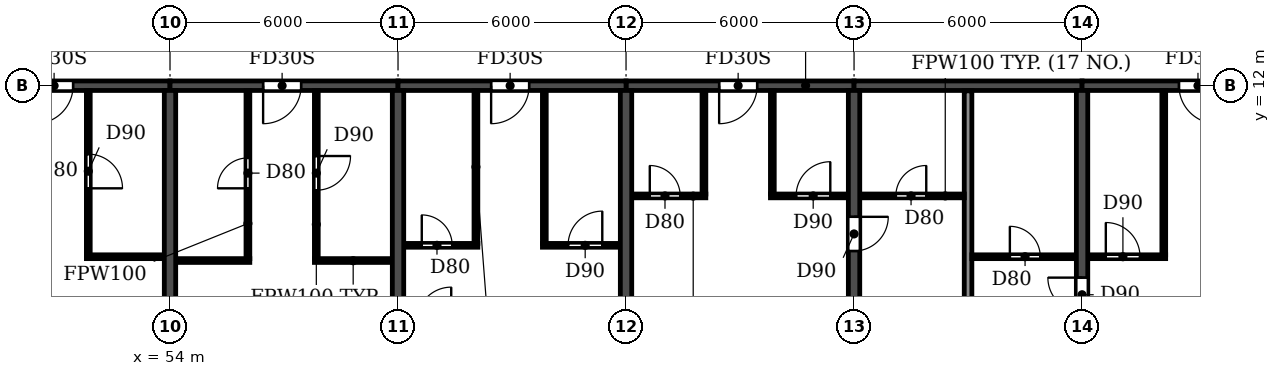
"""IFC4 building model, lengths in metres.
Left out: names, types, materials, properties, quantities, classifications, styles, units other than length and angle.
Written with IfcOpenShell. Run it as: python <this file> out.ifc"""

import sys

from ifc_helpers import new_model, si_unit, direction, frame, frame_2d, origin, place, context, subcontext, project, spatial, rectangle, extrude, element, fill, save


model = new_model("IFC4")
c1 = context("Model", 3, precision=1e-05, world=origin(), true_north=direction((0.0, 1.0)))
c2 = subcontext(c1, "Body", "Model", "MODEL_VIEW")
j1 = project(units=[si_unit("LENGTHUNIT", "METRE"), si_unit("PLANEANGLEUNIT", "RADIAN")], contexts=[c1])
p1 = place(None, origin())
s1 = spatial("IfcSite", under=j1, at=p1, CompositionType="ELEMENT")
p2 = place(p1, origin())
s2 = spatial("IfcBuilding", under=s1, at=p2, CompositionType="ELEMENT")
p3 = place(p2, frame((0.0, 0.0, 142.2)))
s3 = spatial("IfcBuildingStorey", under=s2, at=p3, CompositionType="ELEMENT", Elevation=142.2)
for number, where, z_axis, x_axis in (
    (1, (54.0, 0.2, 0.0), (0.0, 0.0, 1.0), (0.0, 1.0, 0.0)),
    (2, (60.0, 0.2, 0.0), (0.0, 0.0, 1.0), (0.0, 1.0, 0.0)),
    (3, (66.0, 0.2, 0.0), (0.0, 0.0, 1.0), (0.0, 1.0, 0.0)),
):
    element("IfcWall", number, at=place(p3, frame(where, z_axis=z_axis, x_axis=x_axis)), inside=s3, PredefinedType="SHEAR", context=c2, shape_type="SweptSolid", body=[
        extrude(rectangle(XDim=11.675, YDim=0.3, at=frame_2d((5.837, 0.0))), origin(), (0.0, 0.0, 1.0), 3.07),
    ])
p4 = place(p3, frame((72.0, 0.2, 0.0), z_axis=(0.0, 0.0, 1.0), x_axis=(0.0, 1.0, 0.0)))
e4 = element("IfcWall", 4, at=p4, inside=s3, PredefinedType="SHEAR", context=c2, shape_type="SweptSolid", body=[
    extrude(rectangle(XDim=11.675, YDim=0.3, at=frame_2d((5.837, 0.0))), origin(), (0.0, 0.0, 1.0), 3.07),
])
p5 = place(p4, frame((7.45, 0.0, 0.0)))
e5 = element("IfcOpeningElement", 5, at=p5, cuts=e4, PredefinedType="OPENING", context=c2, shape_type="SweptSolid", body=[
    extrude(rectangle(XDim=0.9, YDim=2.1, at=frame_2d((0.45, 1.05))), frame((0.0, 0.16, 0.0), z_axis=(0.0, -1.0, 0.0), x_axis=(1.0, 0.0, 0.0)), (0.0, 0.0, 1.0), 0.32),
])
p6 = place(p3, frame((78.0, 0.2, 0.0), z_axis=(0.0, 0.0, 1.0), x_axis=(0.0, 1.0, 0.0)))
e6 = element("IfcWall", 6, at=p6, inside=s3, PredefinedType="SHEAR", context=c2, shape_type="SweptSolid", body=[
    extrude(rectangle(XDim=11.675, YDim=0.3, at=frame_2d((5.837, 0.0))), origin(), (0.0, 0.0, 1.0), 3.07),
])
p7 = place(p6, frame((5.85, 0.0, 0.0)))
e7 = element("IfcOpeningElement", 7, at=p7, cuts=e6, PredefinedType="OPENING", context=c2, shape_type="SweptSolid", body=[
    extrude(rectangle(XDim=0.9, YDim=2.1, at=frame_2d((0.45, 1.05))), frame((0.0, 0.16, 0.0), z_axis=(0.0, -1.0, 0.0), x_axis=(1.0, 0.0, 0.0)), (0.0, 0.0, 1.0), 0.32),
])
p8 = place(p3, frame((48.0, 12.0, 0.0), z_axis=(0.0, 0.0, 1.0), x_axis=(1.0, 0.0, 0.0)))
e8 = element("IfcWall", 8, at=p8, inside=s3, PredefinedType="SHEAR", context=c2, shape_type="SweptSolid", body=[
    extrude(rectangle(XDim=6.0, YDim=0.25, at=frame_2d((3.0, 0.0))), origin(), (0.0, 0.0, 1.0), 2.47),
])
p9 = place(p8, frame((2.45, 0.0, 0.0)))
e9 = element("IfcOpeningElement", 9, at=p9, cuts=e8, PredefinedType="OPENING", context=c2, shape_type="SweptSolid", body=[
    extrude(rectangle(XDim=1.0, YDim=2.1, at=frame_2d((0.5, 1.05))), frame((0.0, 0.135, 0.0), z_axis=(0.0, -1.0, 0.0), x_axis=(1.0, 0.0, 0.0)), (0.0, 0.0, 1.0), 0.27),
])
p10 = place(p3, frame((54.0, 12.0, 0.0), z_axis=(0.0, 0.0, 1.0), x_axis=(1.0, 0.0, 0.0)))
e10 = element("IfcWall", 10, at=p10, inside=s3, PredefinedType="SHEAR", context=c2, shape_type="SweptSolid", body=[
    extrude(rectangle(XDim=6.0, YDim=0.25, at=frame_2d((3.0, 0.0))), origin(), (0.0, 0.0, 1.0), 2.47),
])
p11 = place(p10, frame((2.45, 0.0, 0.0)))
e11 = element("IfcOpeningElement", 11, at=p11, cuts=e10, PredefinedType="OPENING", context=c2, shape_type="SweptSolid", body=[
    extrude(rectangle(XDim=1.0, YDim=2.1, at=frame_2d((0.5, 1.05))), frame((0.0, 0.135, 0.0), z_axis=(0.0, -1.0, 0.0), x_axis=(1.0, 0.0, 0.0)), (0.0, 0.0, 1.0), 0.27),
])
p12 = place(p3, frame((60.0, 12.0, 0.0), z_axis=(0.0, 0.0, 1.0), x_axis=(1.0, 0.0, 0.0)))
e12 = element("IfcWall", 12, at=p12, inside=s3, PredefinedType="SHEAR", context=c2, shape_type="SweptSolid", body=[
    extrude(rectangle(XDim=6.0, YDim=0.25, at=frame_2d((3.0, 0.0))), origin(), (0.0, 0.0, 1.0), 2.47),
])
p13 = place(p12, frame((2.45, 0.0, 0.0)))
e13 = element("IfcOpeningElement", 13, at=p13, cuts=e12, PredefinedType="OPENING", context=c2, shape_type="SweptSolid", body=[
    extrude(rectangle(XDim=1.0, YDim=2.1, at=frame_2d((0.5, 1.05))), frame((0.0, 0.135, 0.0), z_axis=(0.0, -1.0, 0.0), x_axis=(1.0, 0.0, 0.0)), (0.0, 0.0, 1.0), 0.27),
])
p14 = place(p3, frame((66.0, 12.0, 0.0), z_axis=(0.0, 0.0, 1.0), x_axis=(1.0, 0.0, 0.0)))
e14 = element("IfcWall", 14, at=p14, inside=s3, PredefinedType="SHEAR", context=c2, shape_type="SweptSolid", body=[
    extrude(rectangle(XDim=6.0, YDim=0.25, at=frame_2d((3.0, 0.0))), origin(), (0.0, 0.0, 1.0), 2.47),
])
p15 = place(p14, frame((2.45, 0.0, 0.0)))
e15 = element("IfcOpeningElement", 15, at=p15, cuts=e14, PredefinedType="OPENING", context=c2, shape_type="SweptSolid", body=[
    extrude(rectangle(XDim=1.0, YDim=2.1, at=frame_2d((0.5, 1.05))), frame((0.0, 0.135, 0.0), z_axis=(0.0, -1.0, 0.0), x_axis=(1.0, 0.0, 0.0)), (0.0, 0.0, 1.0), 0.27),
])
p16 = place(p3, frame((72.0, 12.0, 0.0), z_axis=(0.0, 0.0, 1.0), x_axis=(1.0, 0.0, 0.0)))
e16 = element("IfcWall", 16, at=p16, inside=s3, PredefinedType="SHEAR", context=c2, shape_type="SweptSolid", body=[
    extrude(rectangle(XDim=6.0, YDim=0.25, at=frame_2d((3.0, 0.0))), origin(), (0.0, 0.0, 1.0), 2.47),
])
p17 = place(p3, frame((78.0, 12.0, 0.0), z_axis=(0.0, 0.0, 1.0), x_axis=(1.0, 0.0, 0.0)))
e17 = element("IfcWall", 17, at=p17, inside=s3, PredefinedType="SHEAR", context=c2, shape_type="SweptSolid", body=[
    extrude(rectangle(XDim=6.0, YDim=0.25, at=frame_2d((3.0, 0.0))), origin(), (0.0, 0.0, 1.0), 2.47),
])
p18 = place(p17, frame((2.55, 0.0, 0.0)))
e18 = element("IfcOpeningElement", 18, at=p18, cuts=e17, PredefinedType="OPENING", context=c2, shape_type="SweptSolid", body=[
    extrude(rectangle(XDim=1.0, YDim=2.1, at=frame_2d((0.5, 1.05))), frame((0.0, 0.135, 0.0), z_axis=(0.0, -1.0, 0.0), x_axis=(1.0, 0.0, 0.0)), (0.0, 0.0, 1.0), 0.27),
])
p19 = place(p3, frame((75.0, 0.06, 0.0), z_axis=(0.0, 0.0, 1.0), x_axis=(0.0, 1.0, 0.0)))
e19 = element("IfcWall", 19, at=p19, inside=s3, PredefinedType="PARTITIONING", context=c2, shape_type="SweptSolid", body=[
    extrude(rectangle(XDim=11.805, YDim=0.2, at=frame_2d((5.902, 0.0))), origin(), (0.0, 0.0, 1.0), 3.07),
])
p20 = place(p3, frame((54.16, 7.4, 0.0), z_axis=(0.0, 0.0, 1.0), x_axis=(1.0, 0.0, 0.0)))
e20 = element("IfcWall", 20, at=p20, inside=s3, PredefinedType="PARTITIONING", context=c2, shape_type="SweptSolid", body=[
    extrude(rectangle(XDim=1.94, YDim=0.1, at=frame_2d((0.97, 0.0))), origin(), (0.0, 0.0, 1.0), 3.07),
])
for number, where, z_axis, x_axis in (
    (21, (57.8, 7.4, 0.0), (0.0, 0.0, 1.0), (1.0, 0.0, 0.0)),
    (22, (51.8, 7.5, 0.0), (0.0, 0.0, 1.0), (1.0, 0.0, 0.0)),
):
    element("IfcWall", number, at=place(p3, frame(where, z_axis=z_axis, x_axis=x_axis)), inside=s3, PredefinedType="PARTITIONING", context=c2, shape_type="SweptSolid", body=[
        extrude(rectangle(XDim=2.04, YDim=0.1, at=frame_2d((1.02, 0.0))), origin(), (0.0, 0.0, 1.0), 3.07),
    ])
p21 = place(p3, frame((75.1, 7.5, 0.0), z_axis=(0.0, 0.0, 1.0), x_axis=(1.0, 0.0, 0.0)))
e23 = element("IfcWall", 23, at=p21, inside=s3, PredefinedType="PARTITIONING", context=c2, shape_type="SweptSolid", body=[
    extrude(rectangle(XDim=2.74, YDim=0.1, at=frame_2d((1.37, 0.0))), origin(), (0.0, 0.0, 1.0), 3.07),
])
p22 = place(p21, frame((1.0, 0.0, 0.0)))
e24 = element("IfcOpeningElement", 24, at=p22, cuts=e23, PredefinedType="OPENING", context=c2, shape_type="SweptSolid", body=[
    extrude(rectangle(XDim=0.8, YDim=2.1, at=frame_2d((0.4, 1.05))), frame((0.0, 0.06, 0.0), z_axis=(0.0, -1.0, 0.0), x_axis=(1.0, 0.0, 0.0)), (0.0, 0.0, 1.0), 0.12),
])
p23 = place(p3, frame((78.16, 7.5, 0.0), z_axis=(0.0, 0.0, 1.0), x_axis=(1.0, 0.0, 0.0)))
e25 = element("IfcWall", 25, at=p23, inside=s3, PredefinedType="PARTITIONING", context=c2, shape_type="SweptSolid", body=[
    extrude(rectangle(XDim=2.04, YDim=0.1, at=frame_2d((1.02, 0.0))), origin(), (0.0, 0.0, 1.0), 3.07),
])
p24 = place(p23, frame((0.465, 0.0, 0.0)))
e26 = element("IfcOpeningElement", 26, at=p24, cuts=e25, PredefinedType="OPENING", context=c2, shape_type="SweptSolid", body=[
    extrude(rectangle(XDim=0.9, YDim=2.1, at=frame_2d((0.45, 1.05))), frame((0.0, 0.06, 0.0), z_axis=(0.0, -1.0, 0.0), x_axis=(1.0, 0.0, 0.0)), (0.0, 0.0, 1.0), 0.12),
])
p25 = place(p3, frame((60.16, 7.8, 0.0), z_axis=(0.0, 0.0, 1.0), x_axis=(1.0, 0.0, 0.0)))
e27 = element("IfcWall", 27, at=p25, inside=s3, PredefinedType="PARTITIONING", context=c2, shape_type="SweptSolid", body=[
    extrude(rectangle(XDim=1.94, YDim=0.1, at=frame_2d((0.97, 0.0))), origin(), (0.0, 0.0, 1.0), 3.07),
])
p26 = place(p25, frame((0.465, 0.0, 0.0)))
e28 = element("IfcOpeningElement", 28, at=p26, cuts=e27, PredefinedType="OPENING", context=c2, shape_type="SweptSolid", body=[
    extrude(rectangle(XDim=0.8, YDim=2.1, at=frame_2d((0.4, 1.05))), frame((0.0, 0.06, 0.0), z_axis=(0.0, -1.0, 0.0), x_axis=(1.0, 0.0, 0.0)), (0.0, 0.0, 1.0), 0.12),
])
p27 = place(p3, frame((63.8, 7.8, 0.0), z_axis=(0.0, 0.0, 1.0), x_axis=(1.0, 0.0, 0.0)))
e29 = element("IfcWall", 29, at=p27, inside=s3, PredefinedType="PARTITIONING", context=c2, shape_type="SweptSolid", body=[
    extrude(rectangle(XDim=2.04, YDim=0.1, at=frame_2d((1.02, 0.0))), origin(), (0.0, 0.0, 1.0), 3.07),
])
p28 = place(p27, frame((0.675, 0.0, 0.0)))
e30 = element("IfcOpeningElement", 30, at=p28, cuts=e29, PredefinedType="OPENING", context=c2, shape_type="SweptSolid", body=[
    extrude(rectangle(XDim=0.9, YDim=2.1, at=frame_2d((0.45, 1.05))), frame((0.0, 0.06, 0.0), z_axis=(0.0, -1.0, 0.0), x_axis=(1.0, 0.0, 0.0)), (0.0, 0.0, 1.0), 0.12),
])
p29 = place(p3, frame((66.16, 9.1, 0.0), z_axis=(0.0, 0.0, 1.0), x_axis=(1.0, 0.0, 0.0)))
e31 = element("IfcWall", 31, at=p29, inside=s3, PredefinedType="PARTITIONING", context=c2, shape_type="SweptSolid", body=[
    extrude(rectangle(XDim=1.94, YDim=0.1, at=frame_2d((0.97, 0.0))), origin(), (0.0, 0.0, 1.0), 3.07),
])
p30 = place(p29, frame((0.465, 0.0, 0.0)))
e32 = element("IfcOpeningElement", 32, at=p30, cuts=e31, PredefinedType="OPENING", context=c2, shape_type="SweptSolid", body=[
    extrude(rectangle(XDim=0.8, YDim=2.1, at=frame_2d((0.4, 1.05))), frame((0.0, 0.06, 0.0), z_axis=(0.0, -1.0, 0.0), x_axis=(1.0, 0.0, 0.0)), (0.0, 0.0, 1.0), 0.12),
])
p31 = place(p3, frame((69.8, 9.1, 0.0), z_axis=(0.0, 0.0, 1.0), x_axis=(1.0, 0.0, 0.0)))
e33 = element("IfcWall", 33, at=p31, inside=s3, PredefinedType="PARTITIONING", context=c2, shape_type="SweptSolid", body=[
    extrude(rectangle(XDim=2.04, YDim=0.1, at=frame_2d((1.02, 0.0))), origin(), (0.0, 0.0, 1.0), 3.07),
])
p32 = place(p31, frame((0.675, 0.0, 0.0)))
e34 = element("IfcOpeningElement", 34, at=p32, cuts=e33, PredefinedType="OPENING", context=c2, shape_type="SweptSolid", body=[
    extrude(rectangle(XDim=0.9, YDim=2.1, at=frame_2d((0.45, 1.05))), frame((0.0, 0.06, 0.0), z_axis=(0.0, -1.0, 0.0), x_axis=(1.0, 0.0, 0.0)), (0.0, 0.0, 1.0), 0.12),
])
p33 = place(p3, frame((72.16, 9.1, 0.0), z_axis=(0.0, 0.0, 1.0), x_axis=(1.0, 0.0, 0.0)))
e35 = element("IfcWall", 35, at=p33, inside=s3, PredefinedType="PARTITIONING", context=c2, shape_type="SweptSolid", body=[
    extrude(rectangle(XDim=2.74, YDim=0.1, at=frame_2d((1.37, 0.0))), origin(), (0.0, 0.0, 1.0), 3.07),
])
p34 = place(p33, frame((0.94, 0.0, 0.0)))
e36 = element("IfcOpeningElement", 36, at=p34, cuts=e35, PredefinedType="OPENING", context=c2, shape_type="SweptSolid", body=[
    extrude(rectangle(XDim=0.8, YDim=2.1, at=frame_2d((0.4, 1.05))), frame((0.0, 0.06, 0.0), z_axis=(0.0, -1.0, 0.0), x_axis=(1.0, 0.0, 0.0)), (0.0, 0.0, 1.0), 0.12),
])
p35 = place(p3, frame((51.85, 7.55, 0.0), z_axis=(0.0, 0.0, 1.0), x_axis=(0.0, 1.0, 0.0)))
e37 = element("IfcWall", 37, at=p35, inside=s3, PredefinedType="PARTITIONING", context=c2, shape_type="SweptSolid", body=[
    extrude(rectangle(XDim=4.315, YDim=0.1, at=frame_2d((2.157, 0.0))), origin(), (0.0, 0.0, 1.0), 3.07),
])
p36 = place(p35, frame((1.75, 0.0, 0.0)))
e38 = element("IfcOpeningElement", 38, at=p36, cuts=e37, PredefinedType="OPENING", context=c2, shape_type="SweptSolid", body=[
    extrude(rectangle(XDim=0.9, YDim=2.1, at=frame_2d((0.45, 1.05))), frame((0.0, 0.06, 0.0), z_axis=(0.0, -1.0, 0.0), x_axis=(1.0, 0.0, 0.0)), (0.0, 0.0, 1.0), 0.12),
])
p37 = place(p3, frame((56.05, 7.45, 0.0), z_axis=(0.0, 0.0, 1.0), x_axis=(0.0, 1.0, 0.0)))
e39 = element("IfcWall", 39, at=p37, inside=s3, PredefinedType="PARTITIONING", context=c2, shape_type="SweptSolid", body=[
    extrude(rectangle(XDim=4.415, YDim=0.1, at=frame_2d((2.208, 0.0))), origin(), (0.0, 0.0, 1.0), 3.07),
])
p38 = place(p37, frame((1.85, 0.0, 0.0)))
e40 = element("IfcOpeningElement", 40, at=p38, cuts=e39, PredefinedType="OPENING", context=c2, shape_type="SweptSolid", body=[
    extrude(rectangle(XDim=0.8, YDim=2.1, at=frame_2d((0.4, 1.05))), frame((0.0, 0.06, 0.0), z_axis=(0.0, -1.0, 0.0), x_axis=(1.0, 0.0, 0.0)), (0.0, 0.0, 1.0), 0.12),
])
p39 = place(p3, frame((57.85, 7.45, 0.0), z_axis=(0.0, 0.0, 1.0), x_axis=(0.0, 1.0, 0.0)))
e41 = element("IfcWall", 41, at=p39, inside=s3, PredefinedType="PARTITIONING", context=c2, shape_type="SweptSolid", body=[
    extrude(rectangle(XDim=4.415, YDim=0.1, at=frame_2d((2.208, 0.0))), origin(), (0.0, 0.0, 1.0), 3.07),
])
p40 = place(p39, frame((1.8, 0.0, 0.0)))
e42 = element("IfcOpeningElement", 42, at=p40, cuts=e41, PredefinedType="OPENING", context=c2, shape_type="SweptSolid", body=[
    extrude(rectangle(XDim=0.9, YDim=2.1, at=frame_2d((0.45, 1.05))), frame((0.0, 0.06, 0.0), z_axis=(0.0, -1.0, 0.0), x_axis=(1.0, 0.0, 0.0)), (0.0, 0.0, 1.0), 0.12),
])
for number, where, z_axis, x_axis in (
    (43, (62.05, 7.85, 0.0), (0.0, 0.0, 1.0), (0.0, 1.0, 0.0)),
    (44, (63.85, 7.85, 0.0), (0.0, 0.0, 1.0), (0.0, 1.0, 0.0)),
):
    element("IfcWall", number, at=place(p3, frame(where, z_axis=z_axis, x_axis=x_axis)), inside=s3, PredefinedType="PARTITIONING", context=c2, shape_type="SweptSolid", body=[
        extrude(rectangle(XDim=4.015, YDim=0.1, at=frame_2d((2.007, 0.0))), origin(), (0.0, 0.0, 1.0), 3.07),
    ])
for number, where, z_axis, x_axis in (
    (45, (68.05, 9.15, 0.0), (0.0, 0.0, 1.0), (0.0, 1.0, 0.0)),
    (46, (69.85, 9.15, 0.0), (0.0, 0.0, 1.0), (0.0, 1.0, 0.0)),
):
    element("IfcWall", number, at=place(p3, frame(where, z_axis=z_axis, x_axis=x_axis)), inside=s3, PredefinedType="PARTITIONING", context=c2, shape_type="SweptSolid", body=[
        extrude(rectangle(XDim=2.715, YDim=0.1, at=frame_2d((1.357, 0.0))), origin(), (0.0, 0.0, 1.0), 3.07),
    ])
p41 = place(p3, frame((80.15, 7.55, 0.0), z_axis=(0.0, 0.0, 1.0), x_axis=(0.0, 1.0, 0.0)))
e47 = element("IfcWall", 47, at=p41, inside=s3, PredefinedType="PARTITIONING", context=c2, shape_type="SweptSolid", body=[
    extrude(rectangle(XDim=4.315, YDim=0.1, at=frame_2d((2.157, 0.0))), origin(), (0.0, 0.0, 1.0), 3.07),
])
p42 = place(p9, frame((1.0, 0.0, 0.0), z_axis=(0.0, 0.0, 1.0), x_axis=(-1.0, 0.0, 0.0)))
e48 = element("IfcDoor", 48, at=p42, inside=s3, OperationType="SINGLE_SWING_RIGHT", PredefinedType="DOOR", context=c2, shape_type="SweptSolid", body=[
    extrude(rectangle(XDim=1.0, YDim=2.1, at=frame_2d((0.5, 1.05))), frame((0.0, 0.025, 0.0), z_axis=(0.0, -1.0, 0.0), x_axis=(1.0, 0.0, 0.0)), (0.0, 0.0, 1.0), 0.05),
])
fill(e9, e48)
p43 = place(p36, frame((0.9, 0.0, 0.0), z_axis=(0.0, 0.0, 1.0), x_axis=(-1.0, 0.0, 0.0)))
e49 = element("IfcDoor", 49, at=p43, inside=s3, OperationType="SINGLE_SWING_RIGHT", PredefinedType="DOOR", context=c2, shape_type="SweptSolid", body=[
    extrude(rectangle(XDim=0.9, YDim=2.1, at=frame_2d((0.45, 1.05))), frame((0.0, 0.025, 0.0), z_axis=(0.0, -1.0, 0.0), x_axis=(1.0, 0.0, 0.0)), (0.0, 0.0, 1.0), 0.05),
])
fill(e38, e49)
p44 = place(p38, origin())
e50 = element("IfcDoor", 50, at=p44, inside=s3, OperationType="SINGLE_SWING_LEFT", PredefinedType="DOOR", context=c2, shape_type="SweptSolid", body=[
    extrude(rectangle(XDim=0.8, YDim=2.1, at=frame_2d((0.4, 1.05))), frame((0.0, 0.025, 0.0), z_axis=(0.0, -1.0, 0.0), x_axis=(1.0, 0.0, 0.0)), (0.0, 0.0, 1.0), 0.05),
])
fill(e40, e50)
p45 = place(p11, frame((1.0, 0.0, 0.0), z_axis=(0.0, 0.0, 1.0), x_axis=(-1.0, 0.0, 0.0)))
e51 = element("IfcDoor", 51, at=p45, inside=s3, OperationType="SINGLE_SWING_RIGHT", PredefinedType="DOOR", context=c2, shape_type="SweptSolid", body=[
    extrude(rectangle(XDim=1.0, YDim=2.1, at=frame_2d((0.5, 1.05))), frame((0.0, 0.025, 0.0), z_axis=(0.0, -1.0, 0.0), x_axis=(1.0, 0.0, 0.0)), (0.0, 0.0, 1.0), 0.05),
])
fill(e11, e51)
p46 = place(p40, frame((0.9, 0.0, 0.0), z_axis=(0.0, 0.0, 1.0), x_axis=(-1.0, 0.0, 0.0)))
e52 = element("IfcDoor", 52, at=p46, inside=s3, OperationType="SINGLE_SWING_LEFT", PredefinedType="DOOR", context=c2, shape_type="SweptSolid", body=[
    extrude(rectangle(XDim=0.9, YDim=2.1, at=frame_2d((0.45, 1.05))), frame((0.0, 0.025, 0.0), z_axis=(0.0, -1.0, 0.0), x_axis=(1.0, 0.0, 0.0)), (0.0, 0.0, 1.0), 0.05),
])
fill(e42, e52)
p47 = place(p26, origin())
e53 = element("IfcDoor", 53, at=p47, inside=s3, OperationType="SINGLE_SWING_LEFT", PredefinedType="DOOR", context=c2, shape_type="SweptSolid", body=[
    extrude(rectangle(XDim=0.8, YDim=2.1, at=frame_2d((0.4, 1.05))), frame((0.0, 0.025, 0.0), z_axis=(0.0, -1.0, 0.0), x_axis=(1.0, 0.0, 0.0)), (0.0, 0.0, 1.0), 0.05),
])
fill(e28, e53)
p48 = place(p13, frame((1.0, 0.0, 0.0), z_axis=(0.0, 0.0, 1.0), x_axis=(-1.0, 0.0, 0.0)))
e54 = element("IfcDoor", 54, at=p48, inside=s3, OperationType="SINGLE_SWING_RIGHT", PredefinedType="DOOR", context=c2, shape_type="SweptSolid", body=[
    extrude(rectangle(XDim=1.0, YDim=2.1, at=frame_2d((0.5, 1.05))), frame((0.0, 0.025, 0.0), z_axis=(0.0, -1.0, 0.0), x_axis=(1.0, 0.0, 0.0)), (0.0, 0.0, 1.0), 0.05),
])
fill(e13, e54)
p49 = place(p28, origin())
e55 = element("IfcDoor", 55, at=p49, inside=s3, OperationType="SINGLE_SWING_RIGHT", PredefinedType="DOOR", context=c2, shape_type="SweptSolid", body=[
    extrude(rectangle(XDim=0.9, YDim=2.1, at=frame_2d((0.45, 1.05))), frame((0.0, 0.025, 0.0), z_axis=(0.0, -1.0, 0.0), x_axis=(1.0, 0.0, 0.0)), (0.0, 0.0, 1.0), 0.05),
])
fill(e30, e55)
p50 = place(p34, origin())
e56 = element("IfcDoor", 56, at=p50, inside=s3, OperationType="SINGLE_SWING_RIGHT", PredefinedType="DOOR", context=c2, shape_type="SweptSolid", body=[
    extrude(rectangle(XDim=0.8, YDim=2.1, at=frame_2d((0.4, 1.05))), frame((0.0, 0.025, 0.0), z_axis=(0.0, -1.0, 0.0), x_axis=(1.0, 0.0, 0.0)), (0.0, 0.0, 1.0), 0.05),
])
fill(e36, e56)
p51 = place(p30, origin())
e57 = element("IfcDoor", 57, at=p51, inside=s3, OperationType="SINGLE_SWING_LEFT", PredefinedType="DOOR", context=c2, shape_type="SweptSolid", body=[
    extrude(rectangle(XDim=0.8, YDim=2.1, at=frame_2d((0.4, 1.05))), frame((0.0, 0.025, 0.0), z_axis=(0.0, -1.0, 0.0), x_axis=(1.0, 0.0, 0.0)), (0.0, 0.0, 1.0), 0.05),
])
fill(e32, e57)
p52 = place(p15, frame((1.0, 0.0, 0.0), z_axis=(0.0, 0.0, 1.0), x_axis=(-1.0, 0.0, 0.0)))
e58 = element("IfcDoor", 58, at=p52, inside=s3, OperationType="SINGLE_SWING_RIGHT", PredefinedType="DOOR", context=c2, shape_type="SweptSolid", body=[
    extrude(rectangle(XDim=1.0, YDim=2.1, at=frame_2d((0.5, 1.05))), frame((0.0, 0.025, 0.0), z_axis=(0.0, -1.0, 0.0), x_axis=(1.0, 0.0, 0.0)), (0.0, 0.0, 1.0), 0.05),
])
fill(e15, e58)
p53 = place(p32, origin())
e59 = element("IfcDoor", 59, at=p53, inside=s3, OperationType="SINGLE_SWING_RIGHT", PredefinedType="DOOR", context=c2, shape_type="SweptSolid", body=[
    extrude(rectangle(XDim=0.9, YDim=2.1, at=frame_2d((0.45, 1.05))), frame((0.0, 0.025, 0.0), z_axis=(0.0, -1.0, 0.0), x_axis=(1.0, 0.0, 0.0)), (0.0, 0.0, 1.0), 0.05),
])
fill(e34, e59)
p54 = place(p5, frame((0.9, 0.0, 0.0), z_axis=(0.0, 0.0, 1.0), x_axis=(-1.0, 0.0, 0.0)))
e60 = element("IfcDoor", 60, at=p54, inside=s3, OperationType="SINGLE_SWING_LEFT", PredefinedType="DOOR", context=c2, shape_type="SweptSolid", body=[
    extrude(rectangle(XDim=0.9, YDim=2.1, at=frame_2d((0.45, 1.05))), frame((0.0, 0.025, 0.0), z_axis=(0.0, -1.0, 0.0), x_axis=(1.0, 0.0, 0.0)), (0.0, 0.0, 1.0), 0.05),
])
fill(e5, e60)
p55 = place(p22, origin())
e61 = element("IfcDoor", 61, at=p55, inside=s3, OperationType="SINGLE_SWING_LEFT", PredefinedType="DOOR", context=c2, shape_type="SweptSolid", body=[
    extrude(rectangle(XDim=0.8, YDim=2.1, at=frame_2d((0.4, 1.05))), frame((0.0, 0.025, 0.0), z_axis=(0.0, -1.0, 0.0), x_axis=(1.0, 0.0, 0.0)), (0.0, 0.0, 1.0), 0.05),
])
fill(e24, e61)
p56 = place(p7, origin())
e62 = element("IfcDoor", 62, at=p56, inside=s3, OperationType="SINGLE_SWING_RIGHT", PredefinedType="DOOR", context=c2, shape_type="SweptSolid", body=[
    extrude(rectangle(XDim=0.9, YDim=2.1, at=frame_2d((0.45, 1.05))), frame((0.0, 0.025, 0.0), z_axis=(0.0, -1.0, 0.0), x_axis=(1.0, 0.0, 0.0)), (0.0, 0.0, 1.0), 0.05),
])
fill(e7, e62)
p57 = place(p24, origin())
e63 = element("IfcDoor", 63, at=p57, inside=s3, OperationType="SINGLE_SWING_LEFT", PredefinedType="DOOR", context=c2, shape_type="SweptSolid", body=[
    extrude(rectangle(XDim=0.9, YDim=2.1, at=frame_2d((0.45, 1.05))), frame((0.0, 0.025, 0.0), z_axis=(0.0, -1.0, 0.0), x_axis=(1.0, 0.0, 0.0)), (0.0, 0.0, 1.0), 0.05),
])
fill(e26, e63)
p58 = place(p18, frame((1.0, 0.0, 0.0), z_axis=(0.0, 0.0, 1.0), x_axis=(-1.0, 0.0, 0.0)))
e64 = element("IfcDoor", 64, at=p58, inside=s3, OperationType="SINGLE_SWING_LEFT", PredefinedType="DOOR", context=c2, shape_type="SweptSolid", body=[
    extrude(rectangle(XDim=1.0, YDim=2.1, at=frame_2d((0.5, 1.05))), frame((0.0, 0.025, 0.0), z_axis=(0.0, -1.0, 0.0), x_axis=(1.0, 0.0, 0.0)), (0.0, 0.0, 1.0), 0.05),
])
fill(e18, e64)
save(model, sys.argv[1])
